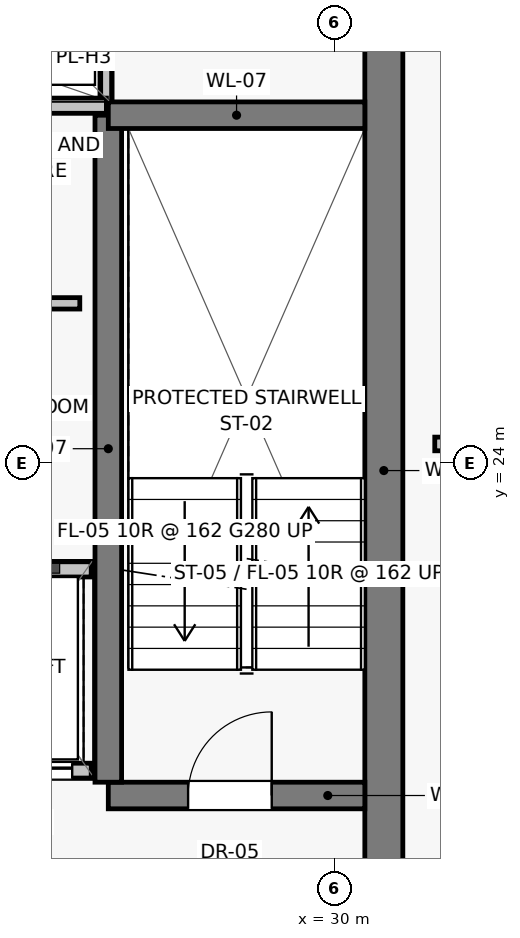
"""IFC4 building model, lengths in metres.
Left out: names, types, materials, properties, quantities, classifications, styles, units other than length and angle.
Written with IfcOpenShell. Run it as: python <this file> out.ifc"""

import sys

from ifc_helpers import new_model, si_unit, direction, frame, frame_2d, origin, place, context, subcontext, project, spatial, rectangle, extrude, source, transform, mapped, element, fill, save


model = new_model("IFC4")
c1 = context("Model", 3, precision=1e-05, world=origin(), true_north=direction((0.0, 1.0)))
c2 = subcontext(c1, "Body", "Model", "MODEL_VIEW")
j1 = project(units=[si_unit("LENGTHUNIT", "METRE"), si_unit("PLANEANGLEUNIT", "RADIAN")], contexts=[c1])
p1 = place(None, origin())
s1 = spatial("IfcSite", under=j1, at=p1, CompositionType="ELEMENT")
p2 = place(p1, origin())
s2 = spatial("IfcBuilding", under=s1, at=p2, CompositionType="ELEMENT")
p3 = place(p2, frame((0.0, 0.0, 233.3)))
s3 = spatial("IfcBuildingStorey", under=s2, at=p3, CompositionType="ELEMENT", Elevation=233.3)
p4 = place(p3, frame((30.65, 16.8, 0.0), z_axis=(0.0, 0.0, 1.0), x_axis=(0.0, 1.0, 0.0)))
e1 = element("IfcWall", 1, at=p4, inside=s3, PredefinedType="SHEAR", context=c2, shape_type="SweptSolid", body=[
    extrude(rectangle(XDim=14.2, YDim=0.5, at=frame_2d((7.1, 0.0))), origin(), (0.0, 0.0, 1.0), 3.015),
])
p5 = place(p3, frame((27.0, 28.65, 0.0), z_axis=(0.0, 0.0, 1.0), x_axis=(0.0, 1.0, 0.0)))
e2 = element("IfcWall", 2, at=p5, inside=s3, PredefinedType="PARTITIONING", context=c2, shape_type="SweptSolid", body=[
    extrude(rectangle(XDim=2.2, YDim=0.15, at=frame_2d((1.1, 0.0))), origin(), (0.0, 0.0, 1.0), 3.015),
])
p6 = place(p3, frame((24.95, 19.95, 0.0), z_axis=(0.0, 0.0, 1.0), x_axis=(1.0, 0.0, 0.0)))
e3 = element("IfcWall", 3, at=p6, inside=s3, PredefinedType="SOLIDWALL", context=c2, shape_type="SweptSolid", body=[
    extrude(rectangle(XDim=1.85, YDim=0.2, at=frame_2d((0.925, 0.0))), origin(), (0.0, 0.0, 1.0), 3.015),
])
p7 = place(p6, frame((0.3, 0.0, 0.0)))
e4 = element("IfcOpeningElement", 4, at=p7, cuts=e3, PredefinedType="OPENING", context=c2, shape_type="SweptSolid", body=[
    extrude(rectangle(XDim=1.3, YDim=2.25, at=frame_2d((0.65, 1.125))), frame((0.0, 0.11, 0.0), z_axis=(0.0, -1.0, 0.0), x_axis=(1.0, 0.0, 0.0)), (0.0, 0.0, 1.0), 0.22),
])
p8 = place(p3, frame((27.025, 19.625, 0.0), z_axis=(0.0, 0.0, 1.0), x_axis=(1.0, 0.0, 0.0)))
e5 = element("IfcWall", 5, at=p8, inside=s3, PredefinedType="SHEAR", context=c2, shape_type="SweptSolid", body=[
    extrude(rectangle(XDim=3.375, YDim=0.35, at=frame_2d((1.688, 0.0))), origin(), (0.0, 0.0, 1.0), 3.015),
])
p9 = place(p8, frame((1.05, 0.0, 0.0)))
e6 = element("IfcOpeningElement", 6, at=p9, cuts=e5, PredefinedType="OPENING", context=c2, shape_type="SweptSolid", body=[
    extrude(rectangle(XDim=1.1, YDim=2.03, at=frame_2d((0.55, 1.015))), frame((0.0, 0.185, 0.0), z_axis=(0.0, -1.0, 0.0), x_axis=(1.0, 0.0, 0.0)), (0.0, 0.0, 1.0), 0.37),
])
p10 = place(p3, frame((27.025, 19.8, 0.0), z_axis=(0.0, 0.0, 1.0), x_axis=(0.0, 1.0, 0.0)))
e7 = element("IfcWall", 7, at=p10, inside=s3, PredefinedType="SHEAR", context=c2, shape_type="SweptSolid", body=[
    extrude(rectangle(XDim=8.775, YDim=0.35, at=frame_2d((4.387, 0.0))), origin(), (0.0, 0.0, 1.0), 3.015),
])
p11 = place(p3, frame((27.025, 28.575, 0.0), z_axis=(0.0, 0.0, 1.0), x_axis=(1.0, 0.0, 0.0)))
e8 = element("IfcWall", 8, at=p11, inside=s3, PredefinedType="SHEAR", context=c2, shape_type="SweptSolid", body=[
    extrude(rectangle(XDim=3.375, YDim=0.35, at=frame_2d((1.688, 0.0))), origin(), (0.0, 0.0, 1.0), 3.015),
])
p12 = place(p3, frame((24.95, 22.6, 0.0), z_axis=(0.0, 0.0, 1.0), x_axis=(1.0, 0.0, 0.0)))
e9 = element("IfcWall", 9, at=p12, inside=s3, PredefinedType="SOLIDWALL", context=c2, shape_type="SweptSolid", body=[
    extrude(rectangle(XDim=1.85, YDim=0.2, at=frame_2d((0.925, 0.0))), origin(), (0.0, 0.0, 1.0), 3.015),
])
p13 = place(p3, frame((21.0, 28.7, 0.0), z_axis=(0.0, 0.0, 1.0), x_axis=(1.0, 0.0, 0.0)))
e10 = element("IfcWall", 10, at=p13, inside=s3, PredefinedType="SOLIDWALL", context=c2, shape_type="SweptSolid", body=[
    extrude(rectangle(XDim=6.0, YDim=0.2, at=frame_2d((3.0, 0.0))), origin(), (0.0, 0.0, 1.0), 3.015),
])
p14 = place(p3, frame((21.35, 26.1, 0.0), z_axis=(0.0, 0.0, 1.0), x_axis=(1.0, 0.0, 0.0)))
e11 = element("IfcWall", 11, at=p14, inside=s3, PredefinedType="PARTITIONING", context=c2, shape_type="SweptSolid", body=[
    extrude(rectangle(XDim=5.3, YDim=0.15, at=frame_2d((2.65, 0.0))), origin(), (0.0, 0.0, 1.0), 3.015),
])
p15 = place(p14, frame((2.2, 0.0, 0.0)))
e12 = element("IfcOpeningElement", 12, at=p15, cuts=e11, PredefinedType="OPENING", context=c2, shape_type="SweptSolid", body=[
    extrude(rectangle(XDim=0.86, YDim=2.01, at=frame_2d((0.43, 1.005))), frame((0.0, 0.085, 0.0), z_axis=(0.0, -1.0, 0.0), x_axis=(1.0, 0.0, 0.0)), (0.0, 0.0, 1.0), 0.17),
])
p16 = place(p3, frame((31.32, 24.25, 0.0), z_axis=(0.0, 0.0, 1.0), x_axis=(1.0, 0.0, 0.0)))
e13 = element("IfcWall", 13, at=p16, inside=s3, PredefinedType="PARTITIONING", context=c2, shape_type="SweptSolid", body=[
    extrude(rectangle(XDim=9.338, YDim=0.18, at=frame_2d((4.669, 0.0))), origin(), (0.0, 0.0, 1.0), 3.015),
])
m1 = source(origin(), c2, "Body", "SweptSolid", [
    extrude(rectangle(XDim=1.3, YDim=2.25, at=frame_2d((0.65, 1.125))), frame((0.0, 0.025, 0.0), z_axis=(0.0, -1.0, 0.0), x_axis=(1.0, 0.0, 0.0)), (0.0, 0.0, 1.0), 0.05),
])
p17 = place(p7, origin())
e14 = element("IfcDoor", 14, at=p17, inside=s3, OperationType="SLIDING_TO_LEFT", PredefinedType="DOOR", context=c2, shape_type="MappedRepresentation", body=[
    mapped(m1, transform((0.0, 0.0, 0.0), scale=1.0)),
])
fill(e4, e14)
m2 = source(origin(), c2, "Body", "SweptSolid", [
    extrude(rectangle(XDim=1.1, YDim=2.03, at=frame_2d((0.55, 1.015))), frame((0.0, 0.025, 0.0), z_axis=(0.0, -1.0, 0.0), x_axis=(1.0, 0.0, 0.0)), (0.0, 0.0, 1.0), 0.05),
])
p18 = place(p9, origin())
e15 = element("IfcDoor", 15, at=p18, inside=s3, OperationType="SINGLE_SWING_RIGHT", PredefinedType="DOOR", context=c2, shape_type="MappedRepresentation", body=[
    mapped(m2, transform((0.0, 0.0, 0.0), scale=1.0)),
])
fill(e6, e15)
save(model, sys.argv[1])
